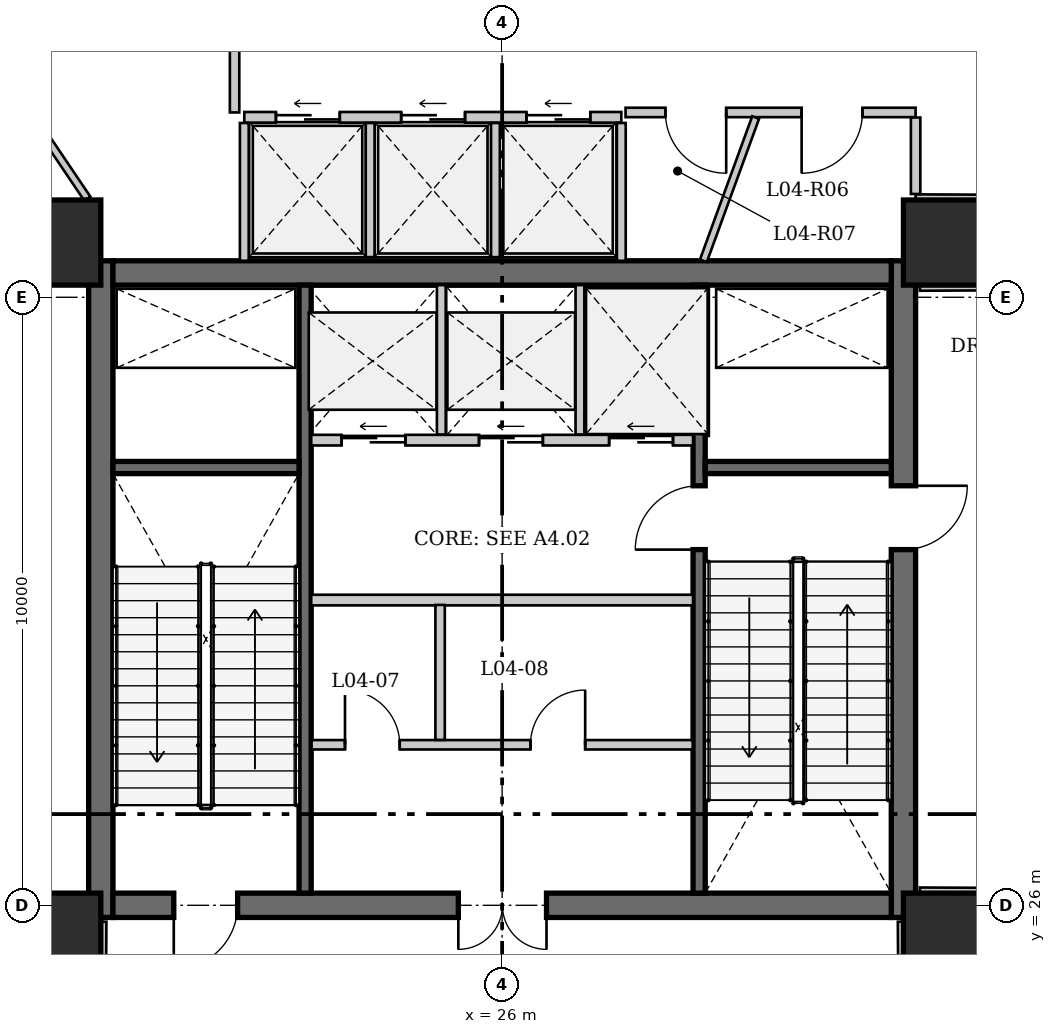
"""IFC4 building model, lengths in metres.
Left out: names, types, materials, properties, quantities, classifications, styles, units other than length and angle.
Written with IfcOpenShell. Run it as: python <this file> out.ifc"""

import sys

from ifc_helpers import new_model, si_unit, direction, frame, frame_2d, origin, origin_2d, place, context, subcontext, project, spatial, rectangle, extrude, source, transform, mapped, element, fill, save


model = new_model("IFC4")
c1 = context("Model", 3, precision=1e-05, world=origin(), true_north=direction((0.0, 1.0)))
c2 = subcontext(c1, "Body", "Model", "MODEL_VIEW")
j1 = project(units=[si_unit("LENGTHUNIT", "METRE"), si_unit("PLANEANGLEUNIT", "RADIAN")], contexts=[c1])
p1 = place(None, origin())
s1 = spatial("IfcSite", under=j1, at=p1, CompositionType="ELEMENT")
p2 = place(p1, origin())
s2 = spatial("IfcBuilding", under=s1, at=p2, CompositionType="ELEMENT")
p3 = place(p2, frame((0.0, 0.0, 19.0)))
s3 = spatial("IfcBuildingStorey", under=s2, at=p3, CompositionType="ELEMENT", Elevation=19.0)
for number, where, z_axis, x_axis in (
    (1, (18.7, 25.5, 0.0), (0.0, 0.0, 1.0), (1.0, 0.0, 0.0)),
    (2, (33.3, 25.5, 0.0), (0.0, 0.0, 1.0), (1.0, 0.0, 0.0)),
    (3, (33.3, 36.9, 0.0), (0.0, 0.0, 1.0), (1.0, 0.0, 0.0)),
    (4, (18.7, 36.9, 0.0), (0.0, 0.0, 1.0), (1.0, 0.0, 0.0)),
):
    element("IfcColumn", number, at=place(p3, frame(where, z_axis=z_axis, x_axis=x_axis)), inside=s3, PredefinedType="COLUMN", context=c2, shape_type="SweptSolid", body=[
        extrude(rectangle(XDim=1.4, YDim=1.4, at=origin_2d()), origin(), (0.0, 0.0, 1.0), 4.55),
    ])
p4 = place(p3, frame((19.4, 25.8, 0.0), z_axis=(0.0, 0.0, 1.0), x_axis=(0.0, 1.0, 0.0)))
e5 = element("IfcWall", 5, at=p4, inside=s3, PredefinedType="SHEAR", context=c2, shape_type="SweptSolid", body=[
    extrude(rectangle(XDim=10.8, YDim=0.4, at=frame_2d((5.4, 0.0))), origin(), (0.0, 0.0, 1.0), 5.0),
])
p5 = place(p3, frame((32.6, 36.6, 0.0), z_axis=(0.0, 0.0, 1.0), x_axis=(0.0, -1.0, 0.0)))
e6 = element("IfcWall", 6, at=p5, inside=s3, PredefinedType="SHEAR", context=c2, shape_type="SweptSolid", body=[
    extrude(rectangle(XDim=10.8, YDim=0.4, at=frame_2d((5.4, 0.0))), origin(), (0.0, 0.0, 1.0), 5.0),
])
p6 = place(p5, frame((3.7, 0.0, 0.0)))
e7 = element("IfcOpeningElement", 7, at=p6, cuts=e6, PredefinedType="OPENING", context=c2, shape_type="SweptSolid", body=[
    extrude(rectangle(XDim=1.05, YDim=2.15, at=frame_2d((0.525, 1.075))), frame((0.0, 0.21, 0.0), z_axis=(0.0, -1.0, 0.0), x_axis=(1.0, 0.0, 0.0)), (0.0, 0.0, 1.0), 0.42),
])
p7 = place(p3, frame((19.6, 36.4, 0.0), z_axis=(0.0, 0.0, 1.0), x_axis=(1.0, 0.0, 0.0)))
e8 = element("IfcWall", 8, at=p7, inside=s3, PredefinedType="SHEAR", context=c2, shape_type="SweptSolid", body=[
    extrude(rectangle(XDim=12.8, YDim=0.4, at=frame_2d((6.4, 0.0))), origin(), (0.0, 0.0, 1.0), 5.0),
])
p8 = place(p3, frame((32.4, 26.0, 0.0), z_axis=(0.0, 0.0, 1.0), x_axis=(-1.0, 0.0, 0.0)))
e9 = element("IfcWall", 9, at=p8, inside=s3, PredefinedType="SHEAR", context=c2, shape_type="SweptSolid", body=[
    extrude(rectangle(XDim=12.8, YDim=0.4, at=frame_2d((6.4, 0.0))), origin(), (0.0, 0.0, 1.0), 5.0),
])
p9 = place(p8, frame((10.75, 0.0, 0.0)))
e10 = element("IfcOpeningElement", 10, at=p9, cuts=e9, PredefinedType="OPENING", context=c2, shape_type="SweptSolid", body=[
    extrude(rectangle(XDim=1.05, YDim=2.15, at=frame_2d((0.525, 1.075))), frame((0.0, 0.21, 0.0), z_axis=(0.0, -1.0, 0.0), x_axis=(1.0, 0.0, 0.0)), (0.0, 0.0, 1.0), 0.42),
])
p10 = place(p8, frame((5.67, 0.0, 0.0)))
e11 = element("IfcOpeningElement", 11, at=p10, cuts=e9, PredefinedType="OPENING", context=c2, shape_type="SweptSolid", body=[
    extrude(rectangle(XDim=1.45, YDim=2.2, at=frame_2d((0.725, 1.1))), frame((0.0, 0.21, 0.0), z_axis=(0.0, -1.0, 0.0), x_axis=(1.0, 0.0, 0.0)), (0.0, 0.0, 1.0), 0.42),
])
p11 = place(p3, frame((22.76, 26.2, 0.0), z_axis=(0.0, 0.0, 1.0), x_axis=(0.0, 1.0, 0.0)))
e12 = element("IfcWall", 12, at=p11, inside=s3, PredefinedType="SHEAR", context=c2, shape_type="SweptSolid", body=[
    extrude(rectangle(XDim=10.0, YDim=0.2, at=frame_2d((5.0, 0.0))), origin(), (0.0, 0.0, 1.0), 5.0),
])
p12 = place(p3, frame((29.24, 26.2, 0.0), z_axis=(0.0, 0.0, 1.0), x_axis=(0.0, 1.0, 0.0)))
e13 = element("IfcWall", 13, at=p12, inside=s3, PredefinedType="SHEAR", context=c2, shape_type="SweptSolid", body=[
    extrude(rectangle(XDim=10.0, YDim=0.2, at=frame_2d((5.0, 0.0))), origin(), (0.0, 0.0, 1.0), 5.0),
])
p13 = place(p12, frame((5.65, 0.0, 0.0)))
e14 = element("IfcOpeningElement", 14, at=p13, cuts=e13, PredefinedType="OPENING", context=c2, shape_type="SweptSolid", body=[
    extrude(rectangle(XDim=1.05, YDim=2.15, at=frame_2d((0.525, 1.075))), frame((0.0, 0.11, 0.0), z_axis=(0.0, -1.0, 0.0), x_axis=(1.0, 0.0, 0.0)), (0.0, 0.0, 1.0), 0.22),
])
for number, where, z_axis, x_axis in (
    (15, (19.6, 33.2, 0.0), (0.0, 0.0, 1.0), (1.0, 0.0, 0.0)),
    (16, (29.34, 33.2, 0.0), (0.0, 0.0, 1.0), (1.0, 0.0, 0.0)),
):
    element("IfcWall", number, at=place(p3, frame(where, z_axis=z_axis, x_axis=x_axis)), inside=s3, PredefinedType="SHEAR", context=c2, shape_type="SweptSolid", body=[
        extrude(rectangle(XDim=3.06, YDim=0.2, at=frame_2d((1.53, 0.0))), origin(), (0.0, 0.0, 1.0), 5.0),
    ])
p14 = place(p3, frame((22.86, 33.65, 0.0), z_axis=(0.0, 0.0, 1.0), x_axis=(1.0, 0.0, 0.0)))
e17 = element("IfcWall", 17, at=p14, inside=s3, PredefinedType="SOLIDWALL", context=c2, shape_type="SweptSolid", body=[
    extrude(rectangle(XDim=6.28, YDim=0.175, at=frame_2d((3.14, 0.0))), origin(), (0.0, 0.0, 1.0), 4.55),
])
p15 = place(p14, frame((0.5, 0.0, 0.0)))
e18 = element("IfcOpeningElement", 18, at=p15, cuts=e17, PredefinedType="OPENING", context=c2, shape_type="SweptSolid", body=[
    extrude(rectangle(XDim=1.05, YDim=2.15, at=frame_2d((0.525, 1.075))), frame((0.0, 0.098, 0.0), z_axis=(0.0, -1.0, 0.0), x_axis=(1.0, 0.0, 0.0)), (0.0, 0.0, 1.0), 0.195),
])
p16 = place(p14, frame((2.76, 0.0, 0.0)))
e19 = element("IfcOpeningElement", 19, at=p16, cuts=e17, PredefinedType="OPENING", context=c2, shape_type="SweptSolid", body=[
    extrude(rectangle(XDim=1.05, YDim=2.15, at=frame_2d((0.525, 1.075))), frame((0.0, 0.098, 0.0), z_axis=(0.0, -1.0, 0.0), x_axis=(1.0, 0.0, 0.0)), (0.0, 0.0, 1.0), 0.195),
])
p17 = place(p14, frame((4.9, 0.0, 0.0)))
e20 = element("IfcOpeningElement", 20, at=p17, cuts=e17, PredefinedType="OPENING", context=c2, shape_type="SweptSolid", body=[
    extrude(rectangle(XDim=1.05, YDim=2.15, at=frame_2d((0.525, 1.075))), frame((0.0, 0.098, 0.0), z_axis=(0.0, -1.0, 0.0), x_axis=(1.0, 0.0, 0.0)), (0.0, 0.0, 1.0), 0.195),
])
for number, where, z_axis, x_axis in (
    (21, (25.0, 33.743, 0.0), (0.0, 0.0, 1.0), (0.0, 1.0, 0.0)),
    (22, (27.28, 33.743, 0.0), (0.0, 0.0, 1.0), (0.0, 1.0, 0.0)),
):
    element("IfcWall", number, at=place(p3, frame(where, z_axis=z_axis, x_axis=x_axis)), inside=s3, PredefinedType="SOLIDWALL", context=c2, shape_type="SweptSolid", body=[
        extrude(rectangle(XDim=2.457, YDim=0.145, at=frame_2d((1.228, 0.0))), origin(), (0.0, 0.0, 1.0), 4.55),
    ])
p18 = place(p3, frame((22.86, 31.02, 0.0), z_axis=(0.0, 0.0, 1.0), x_axis=(1.0, 0.0, 0.0)))
e23 = element("IfcWall", 23, at=p18, inside=s3, PredefinedType="SOLIDWALL", context=c2, shape_type="SweptSolid", body=[
    extrude(rectangle(XDim=6.28, YDim=0.175, at=frame_2d((3.14, 0.0))), origin(), (0.0, 0.0, 1.0), 4.55),
])
p19 = place(p3, frame((22.866, 28.64, 0.0), z_axis=(0.0, 0.0, 1.0), x_axis=(1.0, 0.0, 0.0)))
e24 = element("IfcWall", 24, at=p19, inside=s3, PredefinedType="PARTITIONING", context=c2, shape_type="SweptSolid", body=[
    extrude(rectangle(XDim=6.268, YDim=0.155, at=frame_2d((3.134, 0.0))), origin(), (0.0, 0.0, 1.0), 4.55),
])
p20 = place(p19, frame((0.55, 0.0, 0.0)))
e25 = element("IfcOpeningElement", 25, at=p20, cuts=e24, PredefinedType="OPENING", context=c2, shape_type="SweptSolid", body=[
    extrude(rectangle(XDim=0.9, YDim=2.1, at=frame_2d((0.45, 1.05))), frame((0.0, 0.087, 0.0), z_axis=(0.0, -1.0, 0.0), x_axis=(1.0, 0.0, 0.0)), (0.0, 0.0, 1.0), 0.175),
])
p21 = place(p19, frame((3.6, 0.0, 0.0)))
e26 = element("IfcOpeningElement", 26, at=p21, cuts=e24, PredefinedType="OPENING", context=c2, shape_type="SweptSolid", body=[
    extrude(rectangle(XDim=0.9, YDim=2.1, at=frame_2d((0.45, 1.05))), frame((0.0, 0.087, 0.0), z_axis=(0.0, -1.0, 0.0), x_axis=(1.0, 0.0, 0.0)), (0.0, 0.0, 1.0), 0.175),
])
p22 = place(p3, frame((24.98, 28.72, 0.0), z_axis=(0.0, 0.0, 1.0), x_axis=(0.0, 1.0, 0.0)))
e27 = element("IfcWall", 27, at=p22, inside=s3, PredefinedType="PARTITIONING", context=c2, shape_type="SweptSolid", body=[
    extrude(rectangle(XDim=2.22, YDim=0.155, at=frame_2d((1.11, 0.0))), origin(), (0.0, 0.0, 1.0), 4.55),
])
p23 = place(p3, frame((21.76, 38.96, 0.0), z_axis=(0.0, 0.0, 1.0), x_axis=(1.0, 0.0, 0.0)))
e28 = element("IfcWall", 28, at=p23, inside=s3, PredefinedType="SOLIDWALL", context=c2, shape_type="SweptSolid", body=[
    extrude(rectangle(XDim=6.2, YDim=0.175, at=frame_2d((3.1, 0.0))), origin(), (0.0, 0.0, 1.0), 4.55),
])
p24 = place(p23, frame((0.52, 0.0, 0.0)))
e29 = element("IfcOpeningElement", 29, at=p24, cuts=e28, PredefinedType="OPENING", context=c2, shape_type="SweptSolid", body=[
    extrude(rectangle(XDim=1.05, YDim=2.15, at=frame_2d((0.525, 1.075))), frame((0.0, 0.098, 0.0), z_axis=(0.0, -1.0, 0.0), x_axis=(1.0, 0.0, 0.0)), (0.0, 0.0, 1.0), 0.195),
])
p25 = place(p23, frame((2.58, 0.0, 0.0)))
e30 = element("IfcOpeningElement", 30, at=p25, cuts=e28, PredefinedType="OPENING", context=c2, shape_type="SweptSolid", body=[
    extrude(rectangle(XDim=1.05, YDim=2.15, at=frame_2d((0.525, 1.075))), frame((0.0, 0.098, 0.0), z_axis=(0.0, -1.0, 0.0), x_axis=(1.0, 0.0, 0.0)), (0.0, 0.0, 1.0), 0.195),
])
p26 = place(p23, frame((4.64, 0.0, 0.0)))
e31 = element("IfcOpeningElement", 31, at=p26, cuts=e28, PredefinedType="OPENING", context=c2, shape_type="SweptSolid", body=[
    extrude(rectangle(XDim=1.05, YDim=2.15, at=frame_2d((0.525, 1.075))), frame((0.0, 0.098, 0.0), z_axis=(0.0, -1.0, 0.0), x_axis=(1.0, 0.0, 0.0)), (0.0, 0.0, 1.0), 0.195),
])
for number, where, z_axis, x_axis in (
    (32, (21.76, 36.6, 0.0), (0.0, 0.0, 1.0), (0.0, 1.0, 0.0)),
    (33, (27.96, 36.6, 0.0), (0.0, 0.0, 1.0), (0.0, 1.0, 0.0)),
):
    element("IfcWall", number, at=place(p3, frame(where, z_axis=z_axis, x_axis=x_axis)), inside=s3, PredefinedType="SOLIDWALL", context=c2, shape_type="SweptSolid", body=[
        extrude(rectangle(XDim=2.266, YDim=0.145, at=frame_2d((1.133, 0.0))), origin(), (0.0, 0.0, 1.0), 4.55),
    ])
for number, where, z_axis, x_axis in (
    (34, (23.83, 36.66, 0.0), (0.0, 0.0, 1.0), (0.0, 1.0, 0.0)),
    (35, (25.89, 36.66, 0.0), (0.0, 0.0, 1.0), (0.0, 1.0, 0.0)),
):
    element("IfcWall", number, at=place(p3, frame(where, z_axis=z_axis, x_axis=x_axis)), inside=s3, PredefinedType="SOLIDWALL", context=c2, shape_type="SweptSolid", body=[
        extrude(rectangle(XDim=2.207, YDim=0.145, at=frame_2d((1.103, 0.0))), origin(), (0.0, 0.0, 1.0), 4.55),
    ])
p27 = place(p3, frame((32.8, 39.04, 0.0), z_axis=(0.0, 0.0, 1.0), x_axis=(-1.0, 0.0, 0.0)))
e36 = element("IfcWall", 36, at=p27, inside=s3, PredefinedType="PARTITIONING", context=c2, shape_type="SweptSolid", body=[
    extrude(rectangle(XDim=4.77, YDim=0.155, at=frame_2d((2.385, 0.0))), origin(), (0.0, 0.0, 1.0), 4.55),
])
p28 = place(p27, frame((0.875, 0.0, 0.0)))
e37 = element("IfcOpeningElement", 37, at=p28, cuts=e36, PredefinedType="OPENING", context=c2, shape_type="SweptSolid", body=[
    extrude(rectangle(XDim=1.0, YDim=2.15, at=frame_2d((0.5, 1.075))), frame((0.0, 0.087, 0.0), z_axis=(0.0, -1.0, 0.0), x_axis=(1.0, 0.0, 0.0)), (0.0, 0.0, 1.0), 0.175),
])
p29 = place(p27, frame((3.115, 0.0, 0.0)))
e38 = element("IfcOpeningElement", 38, at=p29, cuts=e36, PredefinedType="OPENING", context=c2, shape_type="SweptSolid", body=[
    extrude(rectangle(XDim=1.0, YDim=2.15, at=frame_2d((0.5, 1.075))), frame((0.0, 0.087, 0.0), z_axis=(0.0, -1.0, 0.0), x_axis=(1.0, 0.0, 0.0)), (0.0, 0.0, 1.0), 0.175),
])
p30 = place(p3, frame((19.409, 24.871, 0.0), z_axis=(0.0, 0.0, 1.0), x_axis=(0.007106130977, 0.999974751133, 0.0)))
e39 = element("IfcWall", 39, at=p30, inside=s3, PredefinedType="PARTITIONING", context=c2, shape_type="SweptSolid", body=[
    extrude(rectangle(XDim=0.859, YDim=0.155, at=frame_2d((0.429, 0.0))), origin(), (0.0, 0.0, 1.0), 4.55),
])
p31 = place(p3, frame((32.585, 25.73, 0.0), z_axis=(0.0, 0.0, 1.0), x_axis=(0.007253695172, -0.999973691607, 0.0)))
e40 = element("IfcWall", 40, at=p31, inside=s3, PredefinedType="PARTITIONING", context=c2, shape_type="SweptSolid", body=[
    extrude(rectangle(XDim=0.942, YDim=0.155, at=frame_2d((0.471, 0.0))), origin(), (0.0, 0.0, 1.0), 4.55),
])
p32 = place(p3, frame((33.928, 26.21, 0.0), z_axis=(0.0, 0.0, 1.0), x_axis=(-0.999988255797, 0.004846469737, 0.0)))
e41 = element("IfcWall", 41, at=p32, inside=s3, PredefinedType="PARTITIONING", context=c2, shape_type="SweptSolid", body=[
    extrude(rectangle(XDim=1.058, YDim=0.155, at=frame_2d((0.529, 0.0))), origin(), (0.0, 0.0, 1.0), 4.55),
])
p33 = place(p3, frame((32.87, 36.185, 0.0), z_axis=(0.0, 0.0, 1.0), x_axis=(0.999988932255, 0.00470482389, 0.0)))
e42 = element("IfcWall", 42, at=p33, inside=s3, PredefinedType="PARTITIONING", context=c2, shape_type="SweptSolid", body=[
    extrude(rectangle(XDim=1.142, YDim=0.155, at=frame_2d((0.571, 0.0))), origin(), (0.0, 0.0, 1.0), 4.55),
])
p34 = place(p3, frame((33.928, 37.61, 0.0), z_axis=(0.0, 0.0, 1.0), x_axis=(-0.999989669582, 0.004545407589, 0.0)))
e43 = element("IfcWall", 43, at=p34, inside=s3, PredefinedType="PARTITIONING", context=c2, shape_type="SweptSolid", body=[
    extrude(rectangle(XDim=1.128, YDim=0.155, at=frame_2d((0.564, 0.0))), origin(), (0.0, 0.0, 1.0), 4.55),
])
p35 = place(p3, frame((32.8, 37.698, 0.0), z_axis=(0.0, 0.0, 1.0), x_axis=(0.0, 1.0, 0.0)))
e44 = element("IfcWall", 44, at=p35, inside=s3, PredefinedType="PARTITIONING", context=c2, shape_type="SweptSolid", body=[
    extrude(rectangle(XDim=1.258, YDim=0.155, at=frame_2d((0.629, 0.0))), origin(), (0.0, 0.0, 1.0), 4.55),
])
p36 = place(p3, frame((21.6, 39.04, 0.0), z_axis=(0.0, 0.0, 1.0), x_axis=(0.0, 1.0, 0.0)))
e45 = element("IfcWall", 45, at=p36, inside=s3, PredefinedType="PARTITIONING", context=c2, shape_type="SweptSolid", body=[
    extrude(rectangle(XDim=1.876, YDim=0.155, at=frame_2d((0.938, 0.0))), origin(), (0.0, 0.0, 1.0), 4.55),
])
p37 = place(p3, frame((29.31, 36.6, 0.0), z_axis=(0.0, 0.0, 1.0), x_axis=(0.342618216876, 0.939474724229, 0.0)))
e46 = element("IfcWall", 46, at=p37, inside=s3, PredefinedType="PARTITIONING", context=c2, shape_type="SweptSolid", body=[
    extrude(rectangle(XDim=2.508, YDim=0.12, at=frame_2d((1.254, 0.0))), origin(), (0.0, 0.0, 1.0), 4.55),
])
p38 = place(p3, frame((19.18, 37.62, 0.0), z_axis=(0.0, 0.0, 1.0), x_axis=(-0.559637794354, 0.828737316121, 0.0)))
e47 = element("IfcWall", 47, at=p38, inside=s3, PredefinedType="PARTITIONING", context=c2, shape_type="SweptSolid", body=[
    extrude(rectangle(XDim=12.151, YDim=0.12, at=frame_2d((6.075, 0.0))), origin(), (0.0, 0.0, 1.0), 4.55),
])
m1 = source(origin(), c2, "Body", "SweptSolid", [
    extrude(rectangle(XDim=1.05, YDim=2.15, at=frame_2d((0.525, 1.075))), frame((0.0, 0.025, 0.0), z_axis=(0.0, -1.0, 0.0), x_axis=(1.0, 0.0, 0.0)), (0.0, 0.0, 1.0), 0.05),
])
p39 = place(p9, origin())
e48 = element("IfcDoor", 48, at=p39, inside=s3, OperationType="SINGLE_SWING_RIGHT", PredefinedType="DOOR", context=c2, shape_type="MappedRepresentation", body=[
    mapped(m1, transform((0.0, 0.0, 0.0), x_axis=(1.0, 0.0, 0.0), y_axis=(0.0, 1.0, 0.0), z_axis=(0.0, 0.0, 1.0), scale=1.0)),
])
fill(e10, e48)
m2 = source(origin(), c2, "Body", "SweptSolid", [
    extrude(rectangle(XDim=1.45, YDim=2.2, at=frame_2d((0.725, 1.1))), frame((0.0, 0.025, 0.0), z_axis=(0.0, -1.0, 0.0), x_axis=(1.0, 0.0, 0.0)), (0.0, 0.0, 1.0), 0.05),
])
p40 = place(p10, origin())
e49 = element("IfcDoor", 49, at=p40, inside=s3, OperationType="DOUBLE_DOOR_SINGLE_SWING", PredefinedType="DOOR", context=c2, shape_type="MappedRepresentation", body=[
    mapped(m2, transform((0.0, 0.0, 0.0), x_axis=(1.0, 0.0, 0.0), y_axis=(0.0, 1.0, 0.0), z_axis=(0.0, 0.0, 1.0), scale=1.0)),
])
fill(e11, e49)
p41 = place(p6, origin())
e50 = element("IfcDoor", 50, at=p41, inside=s3, OperationType="SINGLE_SWING_LEFT", PredefinedType="DOOR", context=c2, shape_type="MappedRepresentation", body=[
    mapped(m1, transform((0.0, 0.0, 0.0), x_axis=(1.0, 0.0, 0.0), y_axis=(0.0, 1.0, 0.0), z_axis=(0.0, 0.0, 1.0), scale=1.0)),
])
fill(e7, e50)
p42 = place(p13, origin())
e51 = element("IfcDoor", 51, at=p42, inside=s3, OperationType="SINGLE_SWING_LEFT", PredefinedType="DOOR", context=c2, shape_type="MappedRepresentation", body=[
    mapped(m1, transform((0.0, 0.0, 0.0), x_axis=(1.0, 0.0, 0.0), y_axis=(0.0, 1.0, 0.0), z_axis=(0.0, 0.0, 1.0), scale=1.0)),
])
fill(e14, e51)
m3 = source(origin(), c2, "Body", "SweptSolid", [
    extrude(rectangle(XDim=1.05, YDim=2.15, at=frame_2d((0.525, 1.075))), frame((0.0, 0.025, 0.0), z_axis=(0.0, -1.0, 0.0), x_axis=(1.0, 0.0, 0.0)), (0.0, 0.0, 1.0), 0.05),
])
p43 = place(p15, origin())
e52 = element("IfcDoor", 52, at=p43, inside=s3, OperationType="SLIDING_TO_LEFT", PredefinedType="DOOR", context=c2, shape_type="MappedRepresentation", body=[
    mapped(m3, transform((0.0, 0.0, 0.0), x_axis=(1.0, 0.0, 0.0), y_axis=(0.0, 1.0, 0.0), z_axis=(0.0, 0.0, 1.0), scale=1.0)),
])
fill(e18, e52)
p44 = place(p16, origin())
e53 = element("IfcDoor", 53, at=p44, inside=s3, OperationType="SLIDING_TO_LEFT", PredefinedType="DOOR", context=c2, shape_type="MappedRepresentation", body=[
    mapped(m3, transform((0.0, 0.0, 0.0), x_axis=(1.0, 0.0, 0.0), y_axis=(0.0, 1.0, 0.0), z_axis=(0.0, 0.0, 1.0), scale=1.0)),
])
fill(e19, e53)
p45 = place(p17, origin())
e54 = element("IfcDoor", 54, at=p45, inside=s3, OperationType="SLIDING_TO_LEFT", PredefinedType="DOOR", context=c2, shape_type="MappedRepresentation", body=[
    mapped(m3, transform((0.0, 0.0, 0.0), x_axis=(1.0, 0.0, 0.0), y_axis=(0.0, 1.0, 0.0), z_axis=(0.0, 0.0, 1.0), scale=1.0)),
])
fill(e20, e54)
m4 = source(origin(), c2, "Body", "SweptSolid", [
    extrude(rectangle(XDim=0.9, YDim=2.1, at=frame_2d((0.45, 1.05))), frame((0.0, 0.025, 0.0), z_axis=(0.0, -1.0, 0.0), x_axis=(1.0, 0.0, 0.0)), (0.0, 0.0, 1.0), 0.05),
])
p46 = place(p20, origin())
e55 = element("IfcDoor", 55, at=p46, inside=s3, OperationType="SINGLE_SWING_LEFT", PredefinedType="DOOR", context=c2, shape_type="MappedRepresentation", body=[
    mapped(m4, transform((0.0, 0.0, 0.0), x_axis=(1.0, 0.0, 0.0), y_axis=(0.0, 1.0, 0.0), z_axis=(0.0, 0.0, 1.0), scale=1.0)),
])
fill(e25, e55)
p47 = place(p21, origin())
e56 = element("IfcDoor", 56, at=p47, inside=s3, OperationType="SINGLE_SWING_RIGHT", PredefinedType="DOOR", context=c2, shape_type="MappedRepresentation", body=[
    mapped(m4, transform((0.0, 0.0, 0.0), x_axis=(1.0, 0.0, 0.0), y_axis=(0.0, 1.0, 0.0), z_axis=(0.0, 0.0, 1.0), scale=1.0)),
])
fill(e26, e56)
p48 = place(p24, origin())
e57 = element("IfcDoor", 57, at=p48, inside=s3, OperationType="SLIDING_TO_LEFT", PredefinedType="DOOR", context=c2, shape_type="MappedRepresentation", body=[
    mapped(m3, transform((0.0, 0.0, 0.0), x_axis=(1.0, 0.0, 0.0), y_axis=(0.0, 1.0, 0.0), z_axis=(0.0, 0.0, 1.0), scale=1.0)),
])
fill(e29, e57)
p49 = place(p25, origin())
e58 = element("IfcDoor", 58, at=p49, inside=s3, OperationType="SLIDING_TO_LEFT", PredefinedType="DOOR", context=c2, shape_type="MappedRepresentation", body=[
    mapped(m3, transform((0.0, 0.0, 0.0), x_axis=(1.0, 0.0, 0.0), y_axis=(0.0, 1.0, 0.0), z_axis=(0.0, 0.0, 1.0), scale=1.0)),
])
fill(e30, e58)
p50 = place(p26, origin())
e59 = element("IfcDoor", 59, at=p50, inside=s3, OperationType="SLIDING_TO_LEFT", PredefinedType="DOOR", context=c2, shape_type="MappedRepresentation", body=[
    mapped(m3, transform((0.0, 0.0, 0.0), x_axis=(1.0, 0.0, 0.0), y_axis=(0.0, 1.0, 0.0), z_axis=(0.0, 0.0, 1.0), scale=1.0)),
])
fill(e31, e59)
m5 = source(origin(), c2, "Body", "SweptSolid", [
    extrude(rectangle(XDim=1.0, YDim=2.15, at=frame_2d((0.5, 1.075))), frame((0.0, 0.025, 0.0), z_axis=(0.0, -1.0, 0.0), x_axis=(1.0, 0.0, 0.0)), (0.0, 0.0, 1.0), 0.05),
])
p51 = place(p28, origin())
e60 = element("IfcDoor", 60, at=p51, inside=s3, OperationType="SINGLE_SWING_RIGHT", PredefinedType="DOOR", context=c2, shape_type="MappedRepresentation", body=[
    mapped(m5, transform((0.0, 0.0, 0.0), x_axis=(1.0, 0.0, 0.0), y_axis=(0.0, 1.0, 0.0), z_axis=(0.0, 0.0, 1.0), scale=1.0)),
])
fill(e37, e60)
p52 = place(p29, origin())
e61 = element("IfcDoor", 61, at=p52, inside=s3, OperationType="SINGLE_SWING_LEFT", PredefinedType="DOOR", context=c2, shape_type="MappedRepresentation", body=[
    mapped(m5, transform((0.0, 0.0, 0.0), x_axis=(1.0, 0.0, 0.0), y_axis=(0.0, 1.0, 0.0), z_axis=(0.0, 0.0, 1.0), scale=1.0)),
])
fill(e38, e61)
save(model, sys.argv[1])
